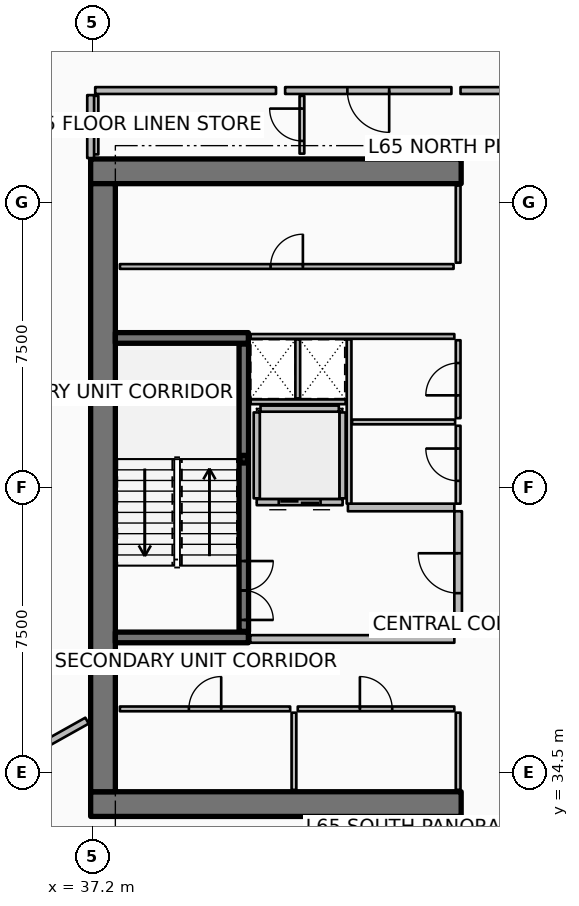
"""IFC4 building model, lengths in metres.
Left out: names, types, materials, properties, quantities, classifications, styles, units other than length and angle.
Written with IfcOpenShell. Run it as: python <this file> out.ifc"""

import sys

from ifc_helpers import new_model, si_unit, direction, frame, frame_2d, origin, origin_2d, place, context, subcontext, project, spatial, rectangle, hollow_rectangle, extrude, element, fill, save


model = new_model("IFC4")
c1 = context("Model", 3, precision=1e-05, world=origin(), true_north=direction((0.0, 1.0)))
c2 = subcontext(c1, "Body", "Model", "MODEL_VIEW")
j1 = project(units=[si_unit("LENGTHUNIT", "METRE"), si_unit("PLANEANGLEUNIT", "RADIAN")], contexts=[c1])
p1 = place(None, origin())
s1 = spatial("IfcSite", under=j1, at=p1, CompositionType="ELEMENT")
p2 = place(p1, origin())
s2 = spatial("IfcBuilding", under=s1, at=p2, CompositionType="ELEMENT")
p3 = place(p2, frame((0.0, 0.0, 259.8)))
s3 = spatial("IfcBuildingStorey", under=s2, at=p3, CompositionType="ELEMENT", Elevation=259.8)
for number, where, z_axis, x_axis in (
    (1, (37.15, 33.675, 0.0), (0.0, 0.0, 1.0), (1.0, 0.0, 0.0)),
    (2, (37.15, 50.325, 0.0), (0.0, 0.0, 1.0), (1.0, 0.0, 0.0)),
):
    element("IfcWall", number, at=place(p3, frame(where, z_axis=z_axis, x_axis=x_axis)), inside=s3, PredefinedType="SHEAR", context=c2, shape_type="SweptSolid", body=[
        extrude(rectangle(XDim=9.75, YDim=0.65, at=frame_2d((4.875, 0.0))), origin(), (0.0, 0.0, 1.0), 3.85),
    ])
p4 = place(p3, frame((37.475, 34.0, 0.0), z_axis=(0.0, 0.0, 1.0), x_axis=(0.0, 1.0, 0.0)))
e3 = element("IfcWall", 3, at=p4, inside=s3, PredefinedType="SHEAR", context=c2, shape_type="SweptSolid", body=[
    extrude(rectangle(XDim=16.0, YDim=0.65, at=frame_2d((8.0, 0.0))), origin(), (0.0, 0.0, 1.0), 3.85),
])
for number, where, z_axis, x_axis in (
    (4, (37.8, 38.06, 0.0), (0.0, 0.0, 1.0), (1.0, 0.0, 0.0)),
    (5, (37.8, 45.94, 0.0), (0.0, 0.0, 1.0), (1.0, 0.0, 0.0)),
):
    element("IfcWall", number, at=place(p3, frame(where, z_axis=z_axis, x_axis=x_axis)), inside=s3, PredefinedType="SHEAR", context=c2, shape_type="SweptSolid", body=[
        extrude(rectangle(XDim=3.5, YDim=0.28, at=frame_2d((1.75, 0.0))), origin(), (0.0, 0.0, 1.0), 3.85),
    ])
p5 = place(p3, frame((41.18, 42.75, 0.0), z_axis=(0.0, 0.0, 1.0), x_axis=(1.0, 0.0, 0.0)))
e6 = element("IfcColumn", 6, at=p5, inside=s3, PredefinedType="COLUMN", context=c2, shape_type="SweptSolid", body=[
    extrude(hollow_rectangle(XDim=0.2, YDim=0.2, WallThickness=0.01, InnerFilletRadius=0.01, OuterFilletRadius=0.02, at=origin_2d()), origin(), (0.0, 0.0, 1.0), 1.72),
])
p6 = place(p3, frame((41.18, 38.22, 0.0), z_axis=(0.0, 0.0, 1.0), x_axis=(0.0, 1.0, 0.0)))
e7 = element("IfcWall", 7, at=p6, inside=s3, PredefinedType="SOLIDWALL", context=c2, shape_type="SweptSolid", body=[
    extrude(rectangle(XDim=7.56, YDim=0.25, at=frame_2d((3.78, 0.0))), origin(), (0.0, 0.0, 1.0), 3.59),
])
p7 = place(p6, frame((0.3, 0.0, 0.0)))
e8 = element("IfcOpeningElement", 8, at=p7, cuts=e7, PredefinedType="OPENING", context=c2, shape_type="SweptSolid", body=[
    extrude(rectangle(XDim=1.55, YDim=2.15, at=frame_2d((0.775, 1.075))), frame((0.0, 0.135, 0.0), z_axis=(0.0, -1.0, 0.0), x_axis=(1.0, 0.0, 0.0)), (0.0, 0.0, 1.0), 0.27),
])
p8 = place(p3, frame((43.78, 41.62, 0.0), z_axis=(0.0, 0.0, 1.0), x_axis=(-1.0, 0.0, 0.0)))
e9 = element("IfcWall", 9, at=p8, inside=s3, PredefinedType="PARTITIONING", context=c2, shape_type="SweptSolid", body=[
    extrude(rectangle(XDim=2.26, YDim=0.16, at=frame_2d((1.13, 0.0))), origin(), (0.0, 0.0, 1.0), 3.59),
])
p9 = place(p8, frame((0.58, 0.0, 0.0)))
e10 = element("IfcOpeningElement", 10, at=p9, cuts=e9, PredefinedType="OPENING", context=c2, shape_type="SweptSolid", body=[
    extrude(rectangle(XDim=1.1, YDim=2.1, at=frame_2d((0.55, 1.05))), frame((0.0, 0.09, 0.0), z_axis=(0.0, -1.0, 0.0), x_axis=(1.0, 0.0, 0.0)), (0.0, 0.0, 1.0), 0.18),
])
for number, where, z_axis, x_axis in (
    (11, (43.78, 41.72, 0.0), (0.0, 0.0, 1.0), (0.0, 1.0, 0.0)),
    (12, (41.52, 41.72, 0.0), (0.0, 0.0, 1.0), (0.0, 1.0, 0.0)),
):
    element("IfcWall", number, at=place(p3, frame(where, z_axis=z_axis, x_axis=x_axis)), inside=s3, PredefinedType="PARTITIONING", context=c2, shape_type="SweptSolid", body=[
        extrude(rectangle(XDim=2.26, YDim=0.16, at=frame_2d((1.13, 0.0))), origin(), (0.0, 0.0, 1.0), 3.59),
    ])
p10 = place(p3, frame((41.62, 44.08, 0.0), z_axis=(0.0, 0.0, 1.0), x_axis=(1.0, 0.0, 0.0)))
e13 = element("IfcWall", 13, at=p10, inside=s3, PredefinedType="PARTITIONING", context=c2, shape_type="SweptSolid", body=[
    extrude(rectangle(XDim=2.06, YDim=0.16, at=frame_2d((1.03, 0.0))), origin(), (0.0, 0.0, 1.0), 3.59),
])
for number, where, z_axis, x_axis in (
    (14, (46.82, 34.05, 0.0), (0.0, 0.0, 1.0), (0.0, 1.0, 0.0)),
    (15, (42.5, 34.05, 0.0), (0.0, 0.0, 1.0), (0.0, 1.0, 0.0)),
):
    element("IfcWall", number, at=place(p3, frame(where, z_axis=z_axis, x_axis=x_axis)), inside=s3, PredefinedType="PARTITIONING", context=c2, shape_type="SweptSolid", body=[
        extrude(rectangle(XDim=2.03, YDim=0.125, at=frame_2d((1.015, 0.0))), origin(), (0.0, 0.0, 1.0), 3.03),
    ])
p11 = place(p3, frame((37.92, 36.18, 0.0), z_axis=(0.0, 0.0, 1.0), x_axis=(1.0, 0.0, 0.0)))
e16 = element("IfcWall", 16, at=p11, inside=s3, PredefinedType="PARTITIONING", context=c2, shape_type="SweptSolid", body=[
    extrude(rectangle(XDim=4.48, YDim=0.125, at=frame_2d((2.24, 0.0))), origin(), (0.0, 0.0, 1.0), 3.03),
])
p12 = place(p11, frame((1.815, 0.0, 0.0)))
e17 = element("IfcOpeningElement", 17, at=p12, cuts=e16, PredefinedType="OPENING", context=c2, shape_type="SweptSolid", body=[
    extrude(rectangle(XDim=0.85, YDim=2.06, at=frame_2d((0.425, 1.03))), frame((0.0, 0.073, 0.0), z_axis=(0.0, -1.0, 0.0), x_axis=(1.0, 0.0, 0.0)), (0.0, 0.0, 1.0), 0.145),
])
p13 = place(p3, frame((42.6, 36.18, 0.0), z_axis=(0.0, 0.0, 1.0), x_axis=(1.0, 0.0, 0.0)))
e18 = element("IfcWall", 18, at=p13, inside=s3, PredefinedType="PARTITIONING", context=c2, shape_type="SweptSolid", body=[
    extrude(rectangle(XDim=4.12, YDim=0.125, at=frame_2d((2.06, 0.0))), origin(), (0.0, 0.0, 1.0), 3.03),
])
p14 = place(p13, frame((1.635, 0.0, 0.0)))
e19 = element("IfcOpeningElement", 19, at=p14, cuts=e18, PredefinedType="OPENING", context=c2, shape_type="SweptSolid", body=[
    extrude(rectangle(XDim=0.85, YDim=2.06, at=frame_2d((0.425, 1.03))), frame((0.0, 0.073, 0.0), z_axis=(0.0, -1.0, 0.0), x_axis=(1.0, 0.0, 0.0)), (0.0, 0.0, 1.0), 0.145),
])
p15 = place(p3, frame((46.82, 47.92, 0.0), z_axis=(0.0, 0.0, 1.0), x_axis=(0.0, 1.0, 0.0)))
e20 = element("IfcWall", 20, at=p15, inside=s3, PredefinedType="PARTITIONING", context=c2, shape_type="SweptSolid", body=[
    extrude(rectangle(XDim=2.03, YDim=0.125, at=frame_2d((1.015, 0.0))), origin(), (0.0, 0.0, 1.0), 3.03),
])
p16 = place(p3, frame((37.92, 47.82, 0.0), z_axis=(0.0, 0.0, 1.0), x_axis=(1.0, 0.0, 0.0)))
e21 = element("IfcWall", 21, at=p16, inside=s3, PredefinedType="PARTITIONING", context=c2, shape_type="SweptSolid", body=[
    extrude(rectangle(XDim=8.78, YDim=0.125, at=frame_2d((4.39, 0.0))), origin(), (0.0, 0.0, 1.0), 3.03),
])
p17 = place(p16, frame((3.965, 0.0, 0.0)))
e22 = element("IfcOpeningElement", 22, at=p17, cuts=e21, PredefinedType="OPENING", context=c2, shape_type="SweptSolid", body=[
    extrude(rectangle(XDim=0.85, YDim=2.06, at=frame_2d((0.425, 1.03))), frame((0.0, 0.073, 0.0), z_axis=(0.0, -1.0, 0.0), x_axis=(1.0, 0.0, 0.0)), (0.0, 0.0, 1.0), 0.145),
])
p18 = place(p3, frame((41.35, 38.02, 0.0), z_axis=(0.0, 0.0, 1.0), x_axis=(1.0, 0.0, 0.0)))
e23 = element("IfcWall", 23, at=p18, inside=s3, PredefinedType="PARTITIONING", context=c2, shape_type="SweptSolid", body=[
    extrude(rectangle(XDim=5.37, YDim=0.2, at=frame_2d((2.685, 0.0))), origin(), (0.0, 0.0, 1.0), 3.59),
])
p19 = place(p3, frame((43.92, 41.48, 0.0), z_axis=(0.0, 0.0, 1.0), x_axis=(1.0, 0.0, 0.0)))
e24 = element("IfcWall", 24, at=p19, inside=s3, PredefinedType="PARTITIONING", context=c2, shape_type="SweptSolid", body=[
    extrude(rectangle(XDim=2.8, YDim=0.2, at=frame_2d((1.4, 0.0))), origin(), (0.0, 0.0, 1.0), 3.59),
])
p20 = place(p3, frame((46.82, 38.12, 0.0), z_axis=(0.0, 0.0, 1.0), x_axis=(0.0, 1.0, 0.0)))
e25 = element("IfcWall", 25, at=p20, inside=s3, PredefinedType="PARTITIONING", context=c2, shape_type="SweptSolid", body=[
    extrude(rectangle(XDim=3.26, YDim=0.2, at=frame_2d((1.63, 0.0))), origin(), (0.0, 0.0, 1.0), 3.59),
])
p21 = place(p20, frame((1.105, 0.0, 0.0)))
e26 = element("IfcOpeningElement", 26, at=p21, cuts=e25, PredefinedType="OPENING", context=c2, shape_type="SweptSolid", body=[
    extrude(rectangle(XDim=1.05, YDim=2.1, at=frame_2d((0.525, 1.05))), frame((0.0, 0.11, 0.0), z_axis=(0.0, -1.0, 0.0), x_axis=(1.0, 0.0, 0.0)), (0.0, 0.0, 1.0), 0.22),
])
p22 = place(p3, frame((41.36, 45.98, 0.0), z_axis=(0.0, 0.0, 1.0), x_axis=(1.0, 0.0, 0.0)))
e27 = element("IfcWall", 27, at=p22, inside=s3, PredefinedType="PARTITIONING", context=c2, shape_type="SweptSolid", body=[
    extrude(rectangle(XDim=5.36, YDim=0.125, at=frame_2d((2.68, 0.0))), origin(), (0.0, 0.0, 1.0), 3.03),
])
p23 = place(p3, frame((41.36, 44.26, 0.0), z_axis=(0.0, 0.0, 1.0), x_axis=(1.0, 0.0, 0.0)))
e28 = element("IfcWall", 28, at=p23, inside=s3, PredefinedType="PARTITIONING", context=c2, shape_type="SweptSolid", body=[
    extrude(rectangle(XDim=2.5, YDim=0.125, at=frame_2d((1.25, 0.0))), origin(), (0.0, 0.0, 1.0), 3.03),
])
p24 = place(p3, frame((42.6, 44.35, 0.0), z_axis=(0.0, 0.0, 1.0), x_axis=(0.0, 1.0, 0.0)))
e29 = element("IfcWall", 29, at=p24, inside=s3, PredefinedType="PARTITIONING", context=c2, shape_type="SweptSolid", body=[
    extrude(rectangle(XDim=1.55, YDim=0.125, at=frame_2d((0.775, 0.0))), origin(), (0.0, 0.0, 1.0), 3.03),
])
p25 = place(p3, frame((43.95, 41.58, 0.0), z_axis=(0.0, 0.0, 1.0), x_axis=(0.0, 1.0, 0.0)))
e30 = element("IfcWall", 30, at=p25, inside=s3, PredefinedType="PARTITIONING", context=c2, shape_type="SweptSolid", body=[
    extrude(rectangle(XDim=4.32, YDim=0.125, at=frame_2d((2.16, 0.0))), origin(), (0.0, 0.0, 1.0), 3.03),
])
p26 = place(p3, frame((44.03, 43.73, 0.0), z_axis=(0.0, 0.0, 1.0), x_axis=(1.0, 0.0, 0.0)))
e31 = element("IfcWall", 31, at=p26, inside=s3, PredefinedType="PARTITIONING", context=c2, shape_type="SweptSolid", body=[
    extrude(rectangle(XDim=2.71, YDim=0.125, at=frame_2d((1.355, 0.0))), origin(), (0.0, 0.0, 1.0), 3.03),
])
p27 = place(p3, frame((46.82, 41.58, 0.0), z_axis=(0.0, 0.0, 1.0), x_axis=(0.0, 1.0, 0.0)))
e32 = element("IfcWall", 32, at=p27, inside=s3, PredefinedType="PARTITIONING", context=c2, shape_type="SweptSolid", body=[
    extrude(rectangle(XDim=2.05, YDim=0.125, at=frame_2d((1.025, 0.0))), origin(), (0.0, 0.0, 1.0), 3.03),
])
p28 = place(p27, frame((0.6, 0.0, 0.0)))
e33 = element("IfcOpeningElement", 33, at=p28, cuts=e32, PredefinedType="OPENING", context=c2, shape_type="SweptSolid", body=[
    extrude(rectangle(XDim=0.85, YDim=2.06, at=frame_2d((0.425, 1.03))), frame((0.0, 0.073, 0.0), z_axis=(0.0, -1.0, 0.0), x_axis=(1.0, 0.0, 0.0)), (0.0, 0.0, 1.0), 0.145),
])
p29 = place(p3, frame((46.82, 43.83, 0.0), z_axis=(0.0, 0.0, 1.0), x_axis=(0.0, 1.0, 0.0)))
e34 = element("IfcWall", 34, at=p29, inside=s3, PredefinedType="PARTITIONING", context=c2, shape_type="SweptSolid", body=[
    extrude(rectangle(XDim=2.05, YDim=0.125, at=frame_2d((1.025, 0.0))), origin(), (0.0, 0.0, 1.0), 3.03),
])
p30 = place(p29, frame((0.6, 0.0, 0.0)))
e35 = element("IfcOpeningElement", 35, at=p30, cuts=e34, PredefinedType="OPENING", context=c2, shape_type="SweptSolid", body=[
    extrude(rectangle(XDim=0.85, YDim=2.06, at=frame_2d((0.425, 1.03))), frame((0.0, 0.073, 0.0), z_axis=(0.0, -1.0, 0.0), x_axis=(1.0, 0.0, 0.0)), (0.0, 0.0, 1.0), 0.145),
])
p31 = place(p3, frame((37.29, 50.77, 0.0), z_axis=(0.0, 0.0, 1.0), x_axis=(0.0, 1.0, 0.0)))
e36 = element("IfcWall", 36, at=p31, inside=s3, PredefinedType="PARTITIONING", context=c2, shape_type="SweptSolid", body=[
    extrude(rectangle(XDim=1.54, YDim=0.125, at=frame_2d((0.77, 0.0))), origin(), (0.0, 0.0, 1.0), 3.03),
])
p32 = place(p3, frame((42.71, 50.79, 0.0), z_axis=(0.0, 0.0, 1.0), x_axis=(0.0, 1.0, 0.0)))
e37 = element("IfcWall", 37, at=p32, inside=s3, PredefinedType="PARTITIONING", context=c2, shape_type="SweptSolid", body=[
    extrude(rectangle(XDim=1.52, YDim=0.125, at=frame_2d((0.76, 0.0))), origin(), (0.0, 0.0, 1.0), 2.957),
])
p33 = place(p32, frame((0.335, 0.0, 0.0)))
e38 = element("IfcOpeningElement", 38, at=p33, cuts=e37, PredefinedType="OPENING", context=c2, shape_type="SweptSolid", body=[
    extrude(rectangle(XDim=0.85, YDim=2.06, at=frame_2d((0.425, 1.03))), frame((0.0, 0.073, 0.0), z_axis=(0.0, -1.0, 0.0), x_axis=(1.0, 0.0, 0.0)), (0.0, 0.0, 1.0), 0.145),
])
p34 = place(p3, frame((37.054, 35.87, 0.0), z_axis=(0.0, 0.0, 1.0), x_axis=(-0.872490186067, -0.488631635506, 0.0)))
e39 = element("IfcWall", 39, at=p34, inside=s3, PredefinedType="PARTITIONING", context=c2, shape_type="SweptSolid", body=[
    extrude(rectangle(XDim=17.884, YDim=0.18, at=frame_2d((8.942, 0.0))), origin(), (0.0, 0.0, 1.0), 2.957),
])
p35 = place(p3, frame((46.643, 52.45, 0.0), z_axis=(0.0, 0.0, 1.0), x_axis=(-1.0, 0.0, 0.0)))
e40 = element("IfcWall", 40, at=p35, inside=s3, PredefinedType="PARTITIONING", context=c2, shape_type="SweptSolid", body=[
    extrude(rectangle(XDim=4.376, YDim=0.18, at=frame_2d((2.188, 0.0))), origin(), (0.0, 0.0, 1.0), 2.957),
])
p36 = place(p35, frame((1.638, 0.0, 0.0)))
e41 = element("IfcOpeningElement", 41, at=p36, cuts=e40, PredefinedType="OPENING", context=c2, shape_type="SweptSolid", body=[
    extrude(rectangle(XDim=1.1, YDim=2.1, at=frame_2d((0.55, 1.05))), frame((0.0, 0.1, 0.0), z_axis=(0.0, -1.0, 0.0), x_axis=(1.0, 0.0, 0.0)), (0.0, 0.0, 1.0), 0.2),
])
p37 = place(p3, frame((50.827, 52.45, 0.0), z_axis=(0.0, 0.0, 1.0), x_axis=(-1.0, 0.0, 0.0)))
e42 = element("IfcWall", 42, at=p37, inside=s3, PredefinedType="PARTITIONING", context=c2, shape_type="SweptSolid", body=[
    extrude(rectangle(XDim=3.944, YDim=0.18, at=frame_2d((1.972, 0.0))), origin(), (0.0, 0.0, 1.0), 2.957),
])
p38 = place(p3, frame((42.028, 52.45, 0.0), z_axis=(0.0, 0.0, 1.0), x_axis=(-1.0, 0.0, 0.0)))
e43 = element("IfcWall", 43, at=p38, inside=s3, PredefinedType="PARTITIONING", context=c2, shape_type="SweptSolid", body=[
    extrude(rectangle(XDim=4.758, YDim=0.18, at=frame_2d((2.379, 0.0))), origin(), (0.0, 0.0, 1.0), 2.957),
])
p39 = place(p3, frame((37.15, 52.33, 0.0), z_axis=(0.0, 0.0, 1.0), x_axis=(0.0, -1.0, 0.0)))
e44 = element("IfcWall", 44, at=p39, inside=s3, PredefinedType="PARTITIONING", context=c2, shape_type="SweptSolid", body=[
    extrude(rectangle(XDim=1.656, YDim=0.18, at=frame_2d((0.828, 0.0))), origin(), (0.0, 0.0, 1.0), 2.957),
])
p40 = place(p3, frame((39.095, 57.681, 0.0), z_axis=(0.0, 0.0, 1.0), x_axis=(-0.760396866349, -0.649458702033, 0.0)))
e45 = element("IfcWall", 45, at=p40, inside=s3, PredefinedType="PARTITIONING", context=c2, shape_type="SweptSolid", body=[
    extrude(rectangle(XDim=6.824, YDim=0.125, at=frame_2d((3.412, 0.0))), origin(), (0.0, 0.0, 1.0), 2.957),
])
p41 = place(p40, frame((2.962, 0.0, 0.0)))
e46 = element("IfcOpeningElement", 46, at=p41, cuts=e45, PredefinedType="OPENING", context=c2, shape_type="SweptSolid", body=[
    extrude(rectangle(XDim=0.9, YDim=2.08, at=frame_2d((0.45, 1.04))), frame((0.0, 0.073, 0.0), z_axis=(0.0, -1.0, 0.0), x_axis=(1.0, 0.0, 0.0)), (0.0, 0.0, 1.0), 0.145),
])
p42 = place(p7, origin())
e47 = element("IfcDoor", 47, at=p42, inside=s3, OperationType="DOUBLE_DOOR_SINGLE_SWING", PredefinedType="DOOR", context=c2, shape_type="SweptSolid", body=[
    extrude(rectangle(XDim=1.55, YDim=2.15, at=frame_2d((0.775, 1.075))), frame((0.0, 0.025, 0.0), z_axis=(0.0, -1.0, 0.0), x_axis=(1.0, 0.0, 0.0)), (0.0, 0.0, 1.0), 0.05),
])
fill(e8, e47)
p43 = place(p9, origin())
e48 = element("IfcDoor", 48, at=p43, inside=s3, OperationType="DOUBLE_DOOR_SLIDING", PredefinedType="DOOR", context=c2, shape_type="SweptSolid", body=[
    extrude(rectangle(XDim=1.1, YDim=2.1, at=frame_2d((0.55, 1.05))), frame((0.0, 0.025, 0.0), z_axis=(0.0, -1.0, 0.0), x_axis=(1.0, 0.0, 0.0)), (0.0, 0.0, 1.0), 0.05),
])
fill(e10, e48)
p44 = place(p12, origin())
e49 = element("IfcDoor", 49, at=p44, inside=s3, OperationType="SINGLE_SWING_RIGHT", PredefinedType="DOOR", context=c2, shape_type="SweptSolid", body=[
    extrude(rectangle(XDim=0.85, YDim=2.06, at=frame_2d((0.425, 1.03))), frame((0.0, 0.025, 0.0), z_axis=(0.0, -1.0, 0.0), x_axis=(1.0, 0.0, 0.0)), (0.0, 0.0, 1.0), 0.05),
])
fill(e17, e49)
p45 = place(p14, origin())
e50 = element("IfcDoor", 50, at=p45, inside=s3, OperationType="SINGLE_SWING_LEFT", PredefinedType="DOOR", context=c2, shape_type="SweptSolid", body=[
    extrude(rectangle(XDim=0.85, YDim=2.06, at=frame_2d((0.425, 1.03))), frame((0.0, 0.025, 0.0), z_axis=(0.0, -1.0, 0.0), x_axis=(1.0, 0.0, 0.0)), (0.0, 0.0, 1.0), 0.05),
])
fill(e19, e50)
p46 = place(p17, origin())
e51 = element("IfcDoor", 51, at=p46, inside=s3, OperationType="SINGLE_SWING_RIGHT", PredefinedType="DOOR", context=c2, shape_type="SweptSolid", body=[
    extrude(rectangle(XDim=0.85, YDim=2.06, at=frame_2d((0.425, 1.03))), frame((0.0, 0.025, 0.0), z_axis=(0.0, -1.0, 0.0), x_axis=(1.0, 0.0, 0.0)), (0.0, 0.0, 1.0), 0.05),
])
fill(e22, e51)
p47 = place(p21, origin())
e52 = element("IfcDoor", 52, at=p47, inside=s3, OperationType="SINGLE_SWING_RIGHT", PredefinedType="DOOR", context=c2, shape_type="SweptSolid", body=[
    extrude(rectangle(XDim=1.05, YDim=2.1, at=frame_2d((0.525, 1.05))), frame((0.0, 0.025, 0.0), z_axis=(0.0, -1.0, 0.0), x_axis=(1.0, 0.0, 0.0)), (0.0, 0.0, 1.0), 0.05),
])
fill(e26, e52)
p48 = place(p28, origin())
e53 = element("IfcDoor", 53, at=p48, inside=s3, OperationType="SINGLE_SWING_RIGHT", PredefinedType="DOOR", context=c2, shape_type="SweptSolid", body=[
    extrude(rectangle(XDim=0.85, YDim=2.06, at=frame_2d((0.425, 1.03))), frame((0.0, 0.025, 0.0), z_axis=(0.0, -1.0, 0.0), x_axis=(1.0, 0.0, 0.0)), (0.0, 0.0, 1.0), 0.05),
])
fill(e33, e53)
p49 = place(p30, origin())
e54 = element("IfcDoor", 54, at=p49, inside=s3, OperationType="SINGLE_SWING_LEFT", PredefinedType="DOOR", context=c2, shape_type="SweptSolid", body=[
    extrude(rectangle(XDim=0.85, YDim=2.06, at=frame_2d((0.425, 1.03))), frame((0.0, 0.025, 0.0), z_axis=(0.0, -1.0, 0.0), x_axis=(1.0, 0.0, 0.0)), (0.0, 0.0, 1.0), 0.05),
])
fill(e35, e54)
p50 = place(p33, origin())
e55 = element("IfcDoor", 55, at=p50, inside=s3, OperationType="SINGLE_SWING_RIGHT", PredefinedType="DOOR", context=c2, shape_type="SweptSolid", body=[
    extrude(rectangle(XDim=0.85, YDim=2.06, at=frame_2d((0.425, 1.03))), frame((0.0, 0.025, 0.0), z_axis=(0.0, -1.0, 0.0), x_axis=(1.0, 0.0, 0.0)), (0.0, 0.0, 1.0), 0.05),
])
fill(e38, e55)
p51 = place(p36, origin())
e56 = element("IfcDoor", 56, at=p51, inside=s3, OperationType="SINGLE_SWING_LEFT", PredefinedType="DOOR", context=c2, shape_type="SweptSolid", body=[
    extrude(rectangle(XDim=1.1, YDim=2.1, at=frame_2d((0.55, 1.05))), frame((0.0, 0.025, 0.0), z_axis=(0.0, -1.0, 0.0), x_axis=(1.0, 0.0, 0.0)), (0.0, 0.0, 1.0), 0.05),
])
fill(e41, e56)
save(model, sys.argv[1])
